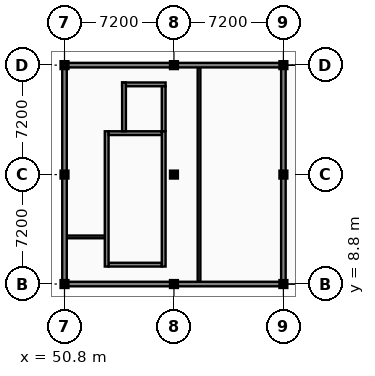
"""IFC4 building model, lengths in metres.
Left out: names, types, materials, properties, quantities, classifications, styles, units other than length and angle.
Written with IfcOpenShell. Run it as: python <this file> out.ifc"""

import sys

from ifc_helpers import new_model, si_unit, direction, frame, frame_2d, origin, origin_2d, place, context, subcontext, project, spatial, rectangle, extrude, element, fill, save


model = new_model("IFC4")
c1 = context("Model", 3, precision=1e-05, world=origin(), true_north=direction((0.0, 1.0)))
c2 = subcontext(c1, "Body", "Model", "MODEL_VIEW")
j1 = project(units=[si_unit("LENGTHUNIT", "METRE"), si_unit("PLANEANGLEUNIT", "RADIAN")], contexts=[c1])
p1 = place(None, origin())
s1 = spatial("IfcSite", under=j1, at=p1, CompositionType="ELEMENT")
p2 = place(p1, origin())
s2 = spatial("IfcBuilding", under=s1, at=p2, CompositionType="ELEMENT")
p3 = place(p2, frame((0.0, 0.0, 13.8)))
s3 = spatial("IfcBuildingStorey", under=s2, at=p3, CompositionType="ELEMENT", Elevation=13.8)
for number, where, z_axis, x_axis in (
    (1, (50.8, 8.8, 0.0), (0.0, 0.0, 1.0), (1.0, 0.0, 0.0)),
    (2, (50.8, 16.0, 0.0), (0.0, 0.0, 1.0), (1.0, 0.0, 0.0)),
    (3, (50.8, 23.2, 0.0), (0.0, 0.0, 1.0), (1.0, 0.0, 0.0)),
    (4, (58.0, 8.8, 0.0), (0.0, 0.0, 1.0), (1.0, 0.0, 0.0)),
    (5, (58.0, 16.0, 0.0), (0.0, 0.0, 1.0), (1.0, 0.0, 0.0)),
    (6, (58.0, 23.2, 0.0), (0.0, 0.0, 1.0), (1.0, 0.0, 0.0)),
    (7, (65.2, 8.8, 0.0), (0.0, 0.0, 1.0), (1.0, 0.0, 0.0)),
    (8, (65.2, 16.0, 0.0), (0.0, 0.0, 1.0), (1.0, 0.0, 0.0)),
    (9, (65.2, 23.2, 0.0), (0.0, 0.0, 1.0), (1.0, 0.0, 0.0)),
):
    element("IfcColumn", number, at=place(p3, frame(where, z_axis=z_axis, x_axis=x_axis)), inside=s3, PredefinedType="COLUMN", context=c2, shape_type="SweptSolid", body=[
        extrude(rectangle(XDim=0.36, YDim=0.36, at=origin_2d()), origin(), (0.0, 0.0, 1.0), 3.62),
    ])
p4 = place(p3, frame((50.94, 11.9, 0.0), z_axis=(0.0, 0.0, 1.0), x_axis=(1.0, 0.0, 0.0)))
e10 = element("IfcWall", 10, at=p4, inside=s3, PredefinedType="PARTITIONING", context=c2, shape_type="SweptSolid", body=[
    extrude(rectangle(XDim=2.66, YDim=0.18, at=frame_2d((1.33, 0.0))), origin(), (0.0, 0.0, 1.0), 3.09),
])
p5 = place(p4, frame((0.83, 0.0, -0.01)))
e11 = element("IfcOpeningElement", 11, at=p5, cuts=e10, PredefinedType="OPENING", context=c2, shape_type="SweptSolid", body=[
    extrude(rectangle(XDim=1.0, YDim=2.16, at=frame_2d((0.5, 1.08))), frame((0.0, 0.1, 0.0), z_axis=(0.0, -1.0, 0.0), x_axis=(1.0, 0.0, 0.0)), (0.0, 0.0, 1.0), 0.2),
])
p6 = place(p3, frame((59.65, 8.94, 0.0), z_axis=(0.0, 0.0, 1.0), x_axis=(0.0, 1.0, 0.0)))
e12 = element("IfcWall", 12, at=p6, inside=s3, PredefinedType="PARTITIONING", context=c2, shape_type="SweptSolid", body=[
    extrude(rectangle(XDim=14.12, YDim=0.18, at=frame_2d((7.06, 0.0))), origin(), (0.0, 0.0, 1.0), 3.01),
])
p7 = place(p6, frame((6.46, 0.0, -0.01)))
e13 = element("IfcOpeningElement", 13, at=p7, cuts=e12, PredefinedType="OPENING", context=c2, shape_type="SweptSolid", body=[
    extrude(rectangle(XDim=1.2, YDim=2.21, at=frame_2d((0.6, 1.105))), frame((0.0, 0.1, 0.0), z_axis=(0.0, -1.0, 0.0), x_axis=(1.0, 0.0, 0.0)), (0.0, 0.0, 1.0), 0.2),
])
p8 = place(p3, frame((50.8, 8.8, 0.0), z_axis=(0.0, 0.0, 1.0), x_axis=(1.0, 0.0, 0.0)))
e14 = element("IfcWall", 14, at=p8, inside=s3, PredefinedType="SOLIDWALL", context=c2, shape_type="SweptSolid", body=[
    extrude(rectangle(XDim=7.2, YDim=0.3, at=frame_2d((3.6, 0.0))), origin(), (0.0, 0.0, 1.0), 3.01),
])
p9 = place(p8, frame((0.46, 0.0, 0.85)))
e15 = element("IfcOpeningElement", 15, at=p9, cuts=e14, PredefinedType="OPENING", context=c2, shape_type="SweptSolid", body=[
    extrude(rectangle(XDim=0.9, YDim=2.02, at=frame_2d((0.45, 1.01))), frame((0.0, 0.16, 0.0), z_axis=(0.0, -1.0, 0.0), x_axis=(1.0, 0.0, 0.0)), (0.0, 0.0, 1.0), 0.32),
])
p10 = place(p8, frame((5.66, 0.0, 0.85)))
e16 = element("IfcOpeningElement", 16, at=p10, cuts=e14, PredefinedType="OPENING", context=c2, shape_type="SweptSolid", body=[
    extrude(rectangle(XDim=0.9, YDim=2.02, at=frame_2d((0.45, 1.01))), frame((0.0, 0.16, 0.0), z_axis=(0.0, -1.0, 0.0), x_axis=(1.0, 0.0, 0.0)), (0.0, 0.0, 1.0), 0.32),
])
p11 = place(p3, frame((58.0, 8.8, 0.0), z_axis=(0.0, 0.0, 1.0), x_axis=(1.0, 0.0, 0.0)))
e17 = element("IfcWall", 17, at=p11, inside=s3, PredefinedType="SOLIDWALL", context=c2, shape_type="SweptSolid", body=[
    extrude(rectangle(XDim=7.2, YDim=0.3, at=frame_2d((3.6, 0.0))), origin(), (0.0, 0.0, 1.0), 3.01),
])
p12 = place(p11, frame((0.46, 0.0, 0.85)))
e18 = element("IfcOpeningElement", 18, at=p12, cuts=e17, PredefinedType="OPENING", context=c2, shape_type="SweptSolid", body=[
    extrude(rectangle(XDim=0.9, YDim=2.02, at=frame_2d((0.45, 1.01))), frame((0.0, 0.16, 0.0), z_axis=(0.0, -1.0, 0.0), x_axis=(1.0, 0.0, 0.0)), (0.0, 0.0, 1.0), 0.32),
])
p13 = place(p11, frame((5.66, 0.0, 0.85)))
e19 = element("IfcOpeningElement", 19, at=p13, cuts=e17, PredefinedType="OPENING", context=c2, shape_type="SweptSolid", body=[
    extrude(rectangle(XDim=0.9, YDim=2.02, at=frame_2d((0.45, 1.01))), frame((0.0, 0.16, 0.0), z_axis=(0.0, -1.0, 0.0), x_axis=(1.0, 0.0, 0.0)), (0.0, 0.0, 1.0), 0.32),
])
p14 = place(p3, frame((65.2, 23.2, 0.0), z_axis=(0.0, 0.0, 1.0), x_axis=(-1.0, 0.0, 0.0)))
e20 = element("IfcWall", 20, at=p14, inside=s3, PredefinedType="SOLIDWALL", context=c2, shape_type="SweptSolid", body=[
    extrude(rectangle(XDim=7.2, YDim=0.3, at=frame_2d((3.6, 0.0))), origin(), (0.0, 0.0, 1.0), 3.01),
])
p15 = place(p14, frame((0.46, 0.0, 0.85)))
e21 = element("IfcOpeningElement", 21, at=p15, cuts=e20, PredefinedType="OPENING", context=c2, shape_type="SweptSolid", body=[
    extrude(rectangle(XDim=0.9, YDim=2.02, at=frame_2d((0.45, 1.01))), frame((0.0, 0.16, 0.0), z_axis=(0.0, -1.0, 0.0), x_axis=(1.0, 0.0, 0.0)), (0.0, 0.0, 1.0), 0.32),
])
p16 = place(p14, frame((4.26, 0.0, 0.85)))
e22 = element("IfcOpeningElement", 22, at=p16, cuts=e20, PredefinedType="OPENING", context=c2, shape_type="SweptSolid", body=[
    extrude(rectangle(XDim=0.9, YDim=2.02, at=frame_2d((0.45, 1.01))), frame((0.0, 0.16, 0.0), z_axis=(0.0, -1.0, 0.0), x_axis=(1.0, 0.0, 0.0)), (0.0, 0.0, 1.0), 0.32),
])
p17 = place(p3, frame((58.0, 23.2, 0.0), z_axis=(0.0, 0.0, 1.0), x_axis=(-1.0, 0.0, 0.0)))
e23 = element("IfcWall", 23, at=p17, inside=s3, PredefinedType="SOLIDWALL", context=c2, shape_type="SweptSolid", body=[
    extrude(rectangle(XDim=7.2, YDim=0.3, at=frame_2d((3.6, 0.0))), origin(), (0.0, 0.0, 1.0), 3.01),
])
p18 = place(p17, frame((0.46, 0.0, 0.85)))
e24 = element("IfcOpeningElement", 24, at=p18, cuts=e23, PredefinedType="OPENING", context=c2, shape_type="SweptSolid", body=[
    extrude(rectangle(XDim=0.9, YDim=2.02, at=frame_2d((0.45, 1.01))), frame((0.0, 0.16, 0.0), z_axis=(0.0, -1.0, 0.0), x_axis=(1.0, 0.0, 0.0)), (0.0, 0.0, 1.0), 0.32),
])
p19 = place(p17, frame((5.66, 0.0, 0.85)))
e25 = element("IfcOpeningElement", 25, at=p19, cuts=e23, PredefinedType="OPENING", context=c2, shape_type="SweptSolid", body=[
    extrude(rectangle(XDim=0.9, YDim=2.02, at=frame_2d((0.45, 1.01))), frame((0.0, 0.16, 0.0), z_axis=(0.0, -1.0, 0.0), x_axis=(1.0, 0.0, 0.0)), (0.0, 0.0, 1.0), 0.32),
])
p20 = place(p3, frame((50.8, 23.2, 0.0), z_axis=(0.0, 0.0, 1.0), x_axis=(0.0, -1.0, 0.0)))
e26 = element("IfcWall", 26, at=p20, inside=s3, PredefinedType="SOLIDWALL", context=c2, shape_type="SweptSolid", body=[
    extrude(rectangle(XDim=7.2, YDim=0.3, at=frame_2d((3.6, 0.0))), origin(), (0.0, 0.0, 1.0), 3.01),
])
p21 = place(p20, frame((0.46, 0.0, 0.85)))
e27 = element("IfcOpeningElement", 27, at=p21, cuts=e26, PredefinedType="OPENING", context=c2, shape_type="SweptSolid", body=[
    extrude(rectangle(XDim=0.9, YDim=2.02, at=frame_2d((0.45, 1.01))), frame((0.0, 0.16, 0.0), z_axis=(0.0, -1.0, 0.0), x_axis=(1.0, 0.0, 0.0)), (0.0, 0.0, 1.0), 0.32),
])
p22 = place(p20, frame((5.66, 0.0, 0.85)))
e28 = element("IfcOpeningElement", 28, at=p22, cuts=e26, PredefinedType="OPENING", context=c2, shape_type="SweptSolid", body=[
    extrude(rectangle(XDim=0.9, YDim=2.02, at=frame_2d((0.45, 1.01))), frame((0.0, 0.16, 0.0), z_axis=(0.0, -1.0, 0.0), x_axis=(1.0, 0.0, 0.0)), (0.0, 0.0, 1.0), 0.32),
])
p23 = place(p3, frame((50.8, 16.0, 0.0), z_axis=(0.0, 0.0, 1.0), x_axis=(0.0, -1.0, 0.0)))
e29 = element("IfcWall", 29, at=p23, inside=s3, PredefinedType="SOLIDWALL", context=c2, shape_type="SweptSolid", body=[
    extrude(rectangle(XDim=7.2, YDim=0.3, at=frame_2d((3.6, 0.0))), origin(), (0.0, 0.0, 1.0), 3.01),
])
p24 = place(p23, frame((0.46, 0.0, 0.85)))
e30 = element("IfcOpeningElement", 30, at=p24, cuts=e29, PredefinedType="OPENING", context=c2, shape_type="SweptSolid", body=[
    extrude(rectangle(XDim=0.9, YDim=2.02, at=frame_2d((0.45, 1.01))), frame((0.0, 0.16, 0.0), z_axis=(0.0, -1.0, 0.0), x_axis=(1.0, 0.0, 0.0)), (0.0, 0.0, 1.0), 0.32),
])
p25 = place(p23, frame((5.66, 0.0, 0.85)))
e31 = element("IfcOpeningElement", 31, at=p25, cuts=e29, PredefinedType="OPENING", context=c2, shape_type="SweptSolid", body=[
    extrude(rectangle(XDim=0.9, YDim=2.02, at=frame_2d((0.45, 1.01))), frame((0.0, 0.16, 0.0), z_axis=(0.0, -1.0, 0.0), x_axis=(1.0, 0.0, 0.0)), (0.0, 0.0, 1.0), 0.32),
])
p26 = place(p3, frame((65.2, 8.8, 0.0), z_axis=(0.0, 0.0, 1.0), x_axis=(0.0, 1.0, 0.0)))
e32 = element("IfcWall", 32, at=p26, inside=s3, PredefinedType="SOLIDWALL", context=c2, shape_type="SweptSolid", body=[
    extrude(rectangle(XDim=7.2, YDim=0.3, at=frame_2d((3.6, 0.0))), origin(), (0.0, 0.0, 1.0), 3.01),
])
p27 = place(p26, frame((2.8, 0.0, -0.01)))
e33 = element("IfcOpeningElement", 33, at=p27, cuts=e32, PredefinedType="OPENING", context=c2, shape_type="SweptSolid", body=[
    extrude(rectangle(XDim=1.2, YDim=2.21, at=frame_2d((0.6, 1.105))), frame((0.0, 0.16, 0.0), z_axis=(0.0, -1.0, 0.0), x_axis=(1.0, 0.0, 0.0)), (0.0, 0.0, 1.0), 0.32),
])
p28 = place(p3, frame((65.2, 16.0, 0.0), z_axis=(0.0, 0.0, 1.0), x_axis=(0.0, 1.0, 0.0)))
e34 = element("IfcWall", 34, at=p28, inside=s3, PredefinedType="SOLIDWALL", context=c2, shape_type="SweptSolid", body=[
    extrude(rectangle(XDim=7.2, YDim=0.3, at=frame_2d((3.6, 0.0))), origin(), (0.0, 0.0, 1.0), 3.01),
])
p29 = place(p28, frame((2.8, 0.0, -0.01)))
e35 = element("IfcOpeningElement", 35, at=p29, cuts=e34, PredefinedType="OPENING", context=c2, shape_type="SweptSolid", body=[
    extrude(rectangle(XDim=1.2, YDim=2.21, at=frame_2d((0.6, 1.105))), frame((0.0, 0.16, 0.0), z_axis=(0.0, -1.0, 0.0), x_axis=(1.0, 0.0, 0.0)), (0.0, 0.0, 1.0), 0.32),
])
p30 = place(p3, frame((53.7, 10.075, 0.0), z_axis=(0.0, 0.0, 1.0), x_axis=(1.0, 0.0, 0.0)))
e36 = element("IfcWall", 36, at=p30, inside=s3, PredefinedType="SHEAR", context=c2, shape_type="SweptSolid", body=[
    extrude(rectangle(XDim=3.5, YDim=0.25, at=frame_2d((1.75, 0.0))), origin(), (0.0, 0.0, 1.0), 3.9),
])
p31 = place(p30, frame((1.1, 0.0, -0.01)))
e37 = element("IfcOpeningElement", 37, at=p31, cuts=e36, PredefinedType="OPENING", context=c2, shape_type="SweptSolid", body=[
    extrude(rectangle(XDim=1.3, YDim=2.16, at=frame_2d((0.65, 1.08))), frame((0.0, 0.135, 0.0), z_axis=(0.0, -1.0, 0.0), x_axis=(1.0, 0.0, 0.0)), (0.0, 0.0, 1.0), 0.27),
])
p32 = place(p3, frame((53.575, 9.95, 0.0), z_axis=(0.0, 0.0, 1.0), x_axis=(0.0, 1.0, 0.0)))
e38 = element("IfcWall", 38, at=p32, inside=s3, PredefinedType="SHEAR", context=c2, shape_type="SweptSolid", body=[
    extrude(rectangle(XDim=8.9, YDim=0.25, at=frame_2d((4.45, 0.0))), origin(), (0.0, 0.0, 1.0), 3.9),
])
p33 = place(p3, frame((57.2, 18.725, 0.0), z_axis=(0.0, 0.0, 1.0), x_axis=(-1.0, 0.0, 0.0)))
e39 = element("IfcWall", 39, at=p33, inside=s3, PredefinedType="SHEAR", context=c2, shape_type="SweptSolid", body=[
    extrude(rectangle(XDim=3.5, YDim=0.25, at=frame_2d((1.75, 0.0))), origin(), (0.0, 0.0, 1.0), 3.9),
])
p34 = place(p3, frame((57.325, 9.95, 0.0), z_axis=(0.0, 0.0, 1.0), x_axis=(0.0, 1.0, 0.0)))
e40 = element("IfcWall", 40, at=p34, inside=s3, PredefinedType="SHEAR", context=c2, shape_type="SweptSolid", body=[
    extrude(rectangle(XDim=8.9, YDim=0.25, at=frame_2d((4.45, 0.0))), origin(), (0.0, 0.0, 1.0), 3.9),
])
p35 = place(p3, frame((54.59, 21.935, 0.0), z_axis=(0.0, 0.0, 1.0), x_axis=(1.0, 0.0, 0.0)))
e41 = element("IfcWall", 41, at=p35, inside=s3, PredefinedType="SHEAR", context=c2, shape_type="SweptSolid", body=[
    extrude(rectangle(XDim=2.86, YDim=0.25, at=frame_2d((1.43, 0.0))), origin(), (0.0, 0.0, 1.0), 3.9),
])
p36 = place(p3, frame((57.325, 18.85, 0.0), z_axis=(0.0, 0.0, 1.0), x_axis=(0.0, 1.0, 0.0)))
e42 = element("IfcWall", 42, at=p36, inside=s3, PredefinedType="SHEAR", context=c2, shape_type="SweptSolid", body=[
    extrude(rectangle(XDim=2.96, YDim=0.25, at=frame_2d((1.48, 0.0))), origin(), (0.0, 0.0, 1.0), 3.9),
])
p37 = place(p36, frame((0.93, 0.0, -0.01)))
e43 = element("IfcOpeningElement", 43, at=p37, cuts=e42, PredefinedType="OPENING", context=c2, shape_type="SweptSolid", body=[
    extrude(rectangle(XDim=1.1, YDim=2.16, at=frame_2d((0.55, 1.08))), frame((0.0, 0.135, 0.0), z_axis=(0.0, -1.0, 0.0), x_axis=(1.0, 0.0, 0.0)), (0.0, 0.0, 1.0), 0.27),
])
p38 = place(p3, frame((54.715, 18.85, 0.0), z_axis=(0.0, 0.0, 1.0), x_axis=(0.0, 1.0, 0.0)))
e44 = element("IfcWall", 44, at=p38, inside=s3, PredefinedType="SHEAR", context=c2, shape_type="SweptSolid", body=[
    extrude(rectangle(XDim=3.21, YDim=0.25, at=frame_2d((1.605, 0.0))), origin(), (0.0, 0.0, 1.0), 3.9),
])
p39 = place(p5, frame((0.0, 0.0, 0.01)))
e45 = element("IfcDoor", 45, at=p39, inside=s3, OperationType="SINGLE_SWING_LEFT", PredefinedType="DOOR", context=c2, shape_type="SweptSolid", body=[
    extrude(rectangle(XDim=1.0, YDim=2.15, at=frame_2d((0.5, 1.075))), frame((0.0, 0.025, 0.0), z_axis=(0.0, -1.0, 0.0), x_axis=(1.0, 0.0, 0.0)), (0.0, 0.0, 1.0), 0.05),
])
fill(e11, e45)
p40 = place(p7, frame((0.0, 0.0, 0.01)))
e46 = element("IfcDoor", 46, at=p40, inside=s3, OperationType="SINGLE_SWING_RIGHT", PredefinedType="DOOR", context=c2, shape_type="SweptSolid", body=[
    extrude(rectangle(XDim=1.2, YDim=2.2, at=frame_2d((0.6, 1.1))), frame((0.0, 0.025, 0.0), z_axis=(0.0, -1.0, 0.0), x_axis=(1.0, 0.0, 0.0)), (0.0, 0.0, 1.0), 0.05),
])
fill(e13, e46)
p41 = place(p9, origin())
e47 = element("IfcWindow", 47, at=p41, inside=s3, PartitioningType="SINGLE_PANEL", PredefinedType="WINDOW", context=c2, shape_type="SweptSolid", body=[
    extrude(rectangle(XDim=0.9, YDim=2.02, at=frame_2d((0.45, 1.01))), frame((0.0, 0.03, 0.0), z_axis=(0.0, -1.0, 0.0), x_axis=(1.0, 0.0, 0.0)), (0.0, 0.0, 1.0), 0.06),
])
fill(e15, e47)
p42 = place(p10, origin())
e48 = element("IfcWindow", 48, at=p42, inside=s3, PartitioningType="SINGLE_PANEL", PredefinedType="WINDOW", context=c2, shape_type="SweptSolid", body=[
    extrude(rectangle(XDim=0.9, YDim=2.02, at=frame_2d((0.45, 1.01))), frame((0.0, 0.03, 0.0), z_axis=(0.0, -1.0, 0.0), x_axis=(1.0, 0.0, 0.0)), (0.0, 0.0, 1.0), 0.06),
])
fill(e16, e48)
p43 = place(p12, origin())
e49 = element("IfcWindow", 49, at=p43, inside=s3, PartitioningType="SINGLE_PANEL", PredefinedType="WINDOW", context=c2, shape_type="SweptSolid", body=[
    extrude(rectangle(XDim=0.9, YDim=2.02, at=frame_2d((0.45, 1.01))), frame((0.0, 0.03, 0.0), z_axis=(0.0, -1.0, 0.0), x_axis=(1.0, 0.0, 0.0)), (0.0, 0.0, 1.0), 0.06),
])
fill(e18, e49)
p44 = place(p13, origin())
e50 = element("IfcWindow", 50, at=p44, inside=s3, PartitioningType="SINGLE_PANEL", PredefinedType="WINDOW", context=c2, shape_type="SweptSolid", body=[
    extrude(rectangle(XDim=0.9, YDim=2.02, at=frame_2d((0.45, 1.01))), frame((0.0, 0.03, 0.0), z_axis=(0.0, -1.0, 0.0), x_axis=(1.0, 0.0, 0.0)), (0.0, 0.0, 1.0), 0.06),
])
fill(e19, e50)
p45 = place(p15, origin())
e51 = element("IfcWindow", 51, at=p45, inside=s3, PartitioningType="SINGLE_PANEL", PredefinedType="WINDOW", context=c2, shape_type="SweptSolid", body=[
    extrude(rectangle(XDim=0.9, YDim=2.02, at=frame_2d((0.45, 1.01))), frame((0.0, 0.03, 0.0), z_axis=(0.0, -1.0, 0.0), x_axis=(1.0, 0.0, 0.0)), (0.0, 0.0, 1.0), 0.06),
])
fill(e21, e51)
p46 = place(p16, origin())
e52 = element("IfcWindow", 52, at=p46, inside=s3, PartitioningType="SINGLE_PANEL", PredefinedType="WINDOW", context=c2, shape_type="SweptSolid", body=[
    extrude(rectangle(XDim=0.9, YDim=2.02, at=frame_2d((0.45, 1.01))), frame((0.0, 0.03, 0.0), z_axis=(0.0, -1.0, 0.0), x_axis=(1.0, 0.0, 0.0)), (0.0, 0.0, 1.0), 0.06),
])
fill(e22, e52)
p47 = place(p18, origin())
e53 = element("IfcWindow", 53, at=p47, inside=s3, PartitioningType="SINGLE_PANEL", PredefinedType="WINDOW", context=c2, shape_type="SweptSolid", body=[
    extrude(rectangle(XDim=0.9, YDim=2.02, at=frame_2d((0.45, 1.01))), frame((0.0, 0.03, 0.0), z_axis=(0.0, -1.0, 0.0), x_axis=(1.0, 0.0, 0.0)), (0.0, 0.0, 1.0), 0.06),
])
fill(e24, e53)
p48 = place(p19, origin())
e54 = element("IfcWindow", 54, at=p48, inside=s3, PartitioningType="SINGLE_PANEL", PredefinedType="WINDOW", context=c2, shape_type="SweptSolid", body=[
    extrude(rectangle(XDim=0.9, YDim=2.02, at=frame_2d((0.45, 1.01))), frame((0.0, 0.03, 0.0), z_axis=(0.0, -1.0, 0.0), x_axis=(1.0, 0.0, 0.0)), (0.0, 0.0, 1.0), 0.06),
])
fill(e25, e54)
p49 = place(p21, origin())
e55 = element("IfcWindow", 55, at=p49, inside=s3, PartitioningType="SINGLE_PANEL", PredefinedType="WINDOW", context=c2, shape_type="SweptSolid", body=[
    extrude(rectangle(XDim=0.9, YDim=2.02, at=frame_2d((0.45, 1.01))), frame((0.0, 0.03, 0.0), z_axis=(0.0, -1.0, 0.0), x_axis=(1.0, 0.0, 0.0)), (0.0, 0.0, 1.0), 0.06),
])
fill(e27, e55)
p50 = place(p22, origin())
e56 = element("IfcWindow", 56, at=p50, inside=s3, PartitioningType="SINGLE_PANEL", PredefinedType="WINDOW", context=c2, shape_type="SweptSolid", body=[
    extrude(rectangle(XDim=0.9, YDim=2.02, at=frame_2d((0.45, 1.01))), frame((0.0, 0.03, 0.0), z_axis=(0.0, -1.0, 0.0), x_axis=(1.0, 0.0, 0.0)), (0.0, 0.0, 1.0), 0.06),
])
fill(e28, e56)
p51 = place(p24, origin())
e57 = element("IfcWindow", 57, at=p51, inside=s3, PartitioningType="SINGLE_PANEL", PredefinedType="WINDOW", context=c2, shape_type="SweptSolid", body=[
    extrude(rectangle(XDim=0.9, YDim=2.02, at=frame_2d((0.45, 1.01))), frame((0.0, 0.03, 0.0), z_axis=(0.0, -1.0, 0.0), x_axis=(1.0, 0.0, 0.0)), (0.0, 0.0, 1.0), 0.06),
])
fill(e30, e57)
p52 = place(p25, origin())
e58 = element("IfcWindow", 58, at=p52, inside=s3, PartitioningType="SINGLE_PANEL", PredefinedType="WINDOW", context=c2, shape_type="SweptSolid", body=[
    extrude(rectangle(XDim=0.9, YDim=2.02, at=frame_2d((0.45, 1.01))), frame((0.0, 0.03, 0.0), z_axis=(0.0, -1.0, 0.0), x_axis=(1.0, 0.0, 0.0)), (0.0, 0.0, 1.0), 0.06),
])
fill(e31, e58)
p53 = place(p27, frame((0.0, 0.0, 0.01)))
e59 = element("IfcDoor", 59, at=p53, inside=s3, OperationType="SINGLE_SWING_RIGHT", PredefinedType="DOOR", context=c2, shape_type="SweptSolid", body=[
    extrude(rectangle(XDim=1.2, YDim=2.2, at=frame_2d((0.6, 1.1))), frame((0.0, 0.025, 0.0), z_axis=(0.0, -1.0, 0.0), x_axis=(1.0, 0.0, 0.0)), (0.0, 0.0, 1.0), 0.05),
])
fill(e33, e59)
p54 = place(p29, frame((0.0, 0.0, 0.01)))
e60 = element("IfcDoor", 60, at=p54, inside=s3, OperationType="SINGLE_SWING_LEFT", PredefinedType="DOOR", context=c2, shape_type="SweptSolid", body=[
    extrude(rectangle(XDim=1.2, YDim=2.2, at=frame_2d((0.6, 1.1))), frame((0.0, 0.025, 0.0), z_axis=(0.0, -1.0, 0.0), x_axis=(1.0, 0.0, 0.0)), (0.0, 0.0, 1.0), 0.05),
])
fill(e35, e60)
p55 = place(p31, frame((1.3, 0.0, 0.01), z_axis=(0.0, 0.0, 1.0), x_axis=(-1.0, 0.0, 0.0)))
e61 = element("IfcDoor", 61, at=p55, inside=s3, OperationType="SINGLE_SWING_LEFT", PredefinedType="DOOR", context=c2, shape_type="SweptSolid", body=[
    extrude(rectangle(XDim=1.3, YDim=2.15, at=frame_2d((0.65, 1.075))), frame((0.0, 0.025, 0.0), z_axis=(0.0, -1.0, 0.0), x_axis=(1.0, 0.0, 0.0)), (0.0, 0.0, 1.0), 0.05),
])
fill(e37, e61)
p56 = place(p37, frame((0.0, 0.0, 0.01)))
e62 = element("IfcDoor", 62, at=p56, inside=s3, OperationType="SLIDING_TO_LEFT", PredefinedType="DOOR", context=c2, shape_type="SweptSolid", body=[
    extrude(rectangle(XDim=1.1, YDim=2.15, at=frame_2d((0.55, 1.075))), frame((0.0, 0.025, 0.0), z_axis=(0.0, -1.0, 0.0), x_axis=(1.0, 0.0, 0.0)), (0.0, 0.0, 1.0), 0.05),
])
fill(e43, e62)
save(model, sys.argv[1])
